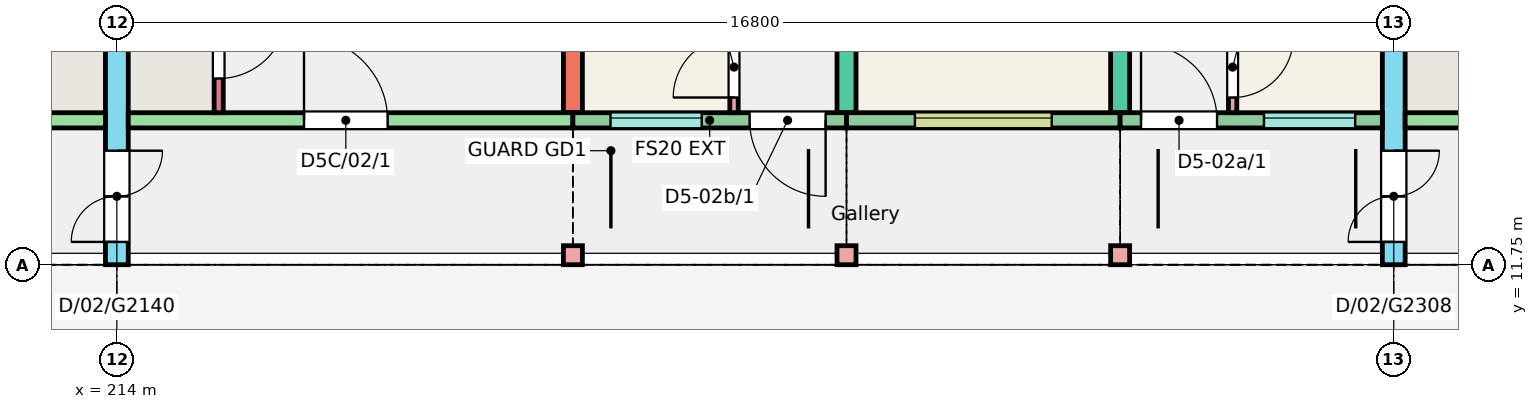
"""IFC4 building model, lengths in metres.
Left out: names, types, materials, properties, quantities, classifications, styles, units other than length and angle.
Written with IfcOpenShell. Run it as: python <this file> out.ifc"""

import sys

from ifc_helpers import new_model, si_unit, direction, frame, frame_2d, origin, origin_2d, place, context, subcontext, project, spatial, rectangle, extrude, element, fill, save


model = new_model("IFC4")
c1 = context("Model", 3, precision=1e-05, world=origin(), true_north=direction((0.0, 1.0)))
c2 = subcontext(c1, "Body", "Model", "MODEL_VIEW")
j1 = project(units=[si_unit("LENGTHUNIT", "METRE"), si_unit("PLANEANGLEUNIT", "RADIAN")], contexts=[c1])
p1 = place(None, origin())
s1 = spatial("IfcSite", under=j1, at=p1, CompositionType="ELEMENT")
p2 = place(p1, origin())
s2 = spatial("IfcBuilding", under=s1, at=p2, CompositionType="ELEMENT")
p3 = place(p2, frame((0.0, 0.0, 6.0)))
s3 = spatial("IfcBuildingStorey", under=s2, at=p3, CompositionType="ELEMENT", Elevation=6.0)
p4 = place(p3, frame((214.0, 11.75, 0.0), z_axis=(0.0, 0.0, 1.0), x_axis=(0.0, 1.0, 0.0)))
e1 = element("IfcWall", 1, at=p4, inside=s3, PredefinedType="SHEAR", context=c2, shape_type="SweptSolid", body=[
    extrude(rectangle(XDim=11.0, YDim=0.3, at=frame_2d((5.5, 0.0))), origin(), (0.0, 0.0, 1.0), 3.0),
])
p5 = place(p4, frame((0.3, 0.0, 0.0)))
e2 = element("IfcOpeningElement", 2, at=p5, cuts=e1, PredefinedType="OPENING", context=c2, shape_type="SweptSolid", body=[
    extrude(rectangle(XDim=1.2, YDim=2.1, at=frame_2d((0.6, 1.05))), frame((0.0, 0.16, 0.0), z_axis=(0.0, -1.0, 0.0), x_axis=(1.0, 0.0, 0.0)), (0.0, 0.0, 1.0), 0.32),
])
p6 = place(p3, frame((220.0, 13.75, 0.0), z_axis=(0.0, 0.0, 1.0), x_axis=(0.0, 1.0, 0.0)))
e3 = element("IfcWall", 3, at=p6, inside=s3, PredefinedType="SHEAR", context=c2, shape_type="SweptSolid", body=[
    extrude(rectangle(XDim=9.0, YDim=0.25, at=frame_2d((4.5, 0.0))), origin(), (0.0, 0.0, 1.0), 3.0),
])
p7 = place(p3, frame((223.6, 13.75, 0.0), z_axis=(0.0, 0.0, 1.0), x_axis=(0.0, 1.0, 0.0)))
e4 = element("IfcWall", 4, at=p7, inside=s3, PredefinedType="SHEAR", context=c2, shape_type="SweptSolid", body=[
    extrude(rectangle(XDim=9.0, YDim=0.25, at=frame_2d((4.5, 0.0))), origin(), (0.0, 0.0, 1.0), 3.0),
])
p8 = place(p7, frame((2.4, 0.0, 0.0)))
e5 = element("IfcOpeningElement", 5, at=p8, cuts=e4, PredefinedType="OPENING", context=c2, shape_type="SweptSolid", body=[
    extrude(rectangle(XDim=1.2, YDim=2.1, at=frame_2d((0.6, 1.05))), frame((0.0, 0.135, 0.0), z_axis=(0.0, -1.0, 0.0), x_axis=(1.0, 0.0, 0.0)), (0.0, 0.0, 1.0), 0.27),
])
p9 = place(p7, frame((6.4, 0.0, 0.0)))
e6 = element("IfcOpeningElement", 6, at=p9, cuts=e4, PredefinedType="OPENING", context=c2, shape_type="SweptSolid", body=[
    extrude(rectangle(XDim=1.2, YDim=2.1, at=frame_2d((0.6, 1.05))), frame((0.0, 0.135, 0.0), z_axis=(0.0, -1.0, 0.0), x_axis=(1.0, 0.0, 0.0)), (0.0, 0.0, 1.0), 0.27),
])
p10 = place(p3, frame((227.2, 13.75, 0.0), z_axis=(0.0, 0.0, 1.0), x_axis=(0.0, 1.0, 0.0)))
e7 = element("IfcWall", 7, at=p10, inside=s3, PredefinedType="SHEAR", context=c2, shape_type="SweptSolid", body=[
    extrude(rectangle(XDim=9.0, YDim=0.25, at=frame_2d((4.5, 0.0))), origin(), (0.0, 0.0, 1.0), 3.0),
])
p11 = place(p3, frame((230.8, 11.75, 0.0), z_axis=(0.0, 0.0, 1.0), x_axis=(0.0, 1.0, 0.0)))
e8 = element("IfcWall", 8, at=p11, inside=s3, PredefinedType="SHEAR", context=c2, shape_type="SweptSolid", body=[
    extrude(rectangle(XDim=11.0, YDim=0.3, at=frame_2d((5.5, 0.0))), origin(), (0.0, 0.0, 1.0), 3.0),
])
p12 = place(p11, frame((0.3, 0.0, 0.0)))
e9 = element("IfcOpeningElement", 9, at=p12, cuts=e8, PredefinedType="OPENING", context=c2, shape_type="SweptSolid", body=[
    extrude(rectangle(XDim=1.2, YDim=2.1, at=frame_2d((0.6, 1.05))), frame((0.0, 0.16, 0.0), z_axis=(0.0, -1.0, 0.0), x_axis=(1.0, 0.0, 0.0)), (0.0, 0.0, 1.0), 0.32),
])
p13 = place(p3, frame((208.0, 13.65, 0.0), z_axis=(0.0, 0.0, 1.0), x_axis=(1.0, 0.0, 0.0)))
e10 = element("IfcWall", 10, at=p13, inside=s3, PredefinedType="SHEAR", context=c2, shape_type="SweptSolid", body=[
    extrude(rectangle(XDim=5.85, YDim=0.2, at=frame_2d((2.925, 0.0))), origin(), (0.0, 0.0, 1.0), 3.0),
])
p14 = place(p13, frame((2.438, 0.0, 0.0)))
e11 = element("IfcOpeningElement", 11, at=p14, cuts=e10, PredefinedType="OPENING", context=c2, shape_type="SweptSolid", body=[
    extrude(rectangle(XDim=1.1, YDim=2.1, at=frame_2d((0.55, 1.05))), frame((0.0, 0.11, 0.0), z_axis=(0.0, -1.0, 0.0), x_axis=(1.0, 0.0, 0.0)), (0.0, 0.0, 1.0), 0.22),
])
p15 = place(p3, frame((214.15, 13.65, 0.0), z_axis=(0.0, 0.0, 1.0), x_axis=(1.0, 0.0, 0.0)))
e12 = element("IfcWall", 12, at=p15, inside=s3, PredefinedType="SHEAR", context=c2, shape_type="SweptSolid", body=[
    extrude(rectangle(XDim=5.85, YDim=0.2, at=frame_2d((2.925, 0.0))), origin(), (0.0, 0.0, 1.0), 3.0),
])
p16 = place(p15, frame((2.312, 0.0, 0.0)))
e13 = element("IfcOpeningElement", 13, at=p16, cuts=e12, PredefinedType="OPENING", context=c2, shape_type="SweptSolid", body=[
    extrude(rectangle(XDim=1.1, YDim=2.1, at=frame_2d((0.55, 1.05))), frame((0.0, 0.11, 0.0), z_axis=(0.0, -1.0, 0.0), x_axis=(1.0, 0.0, 0.0)), (0.0, 0.0, 1.0), 0.22),
])
p17 = place(p3, frame((215.34, 13.75, 0.0), z_axis=(0.0, 0.0, 1.0), x_axis=(0.0, 1.0, 0.0)))
e14 = element("IfcWall", 14, at=p17, inside=s3, PredefinedType="SHEAR", context=c2, shape_type="SweptSolid", body=[
    extrude(rectangle(XDim=1.72, YDim=0.12, at=frame_2d((0.86, 0.0))), origin(), (0.0, 0.0, 1.0), 3.0),
])
p18 = place(p17, frame((0.45, 0.0, 0.0)))
e15 = element("IfcOpeningElement", 15, at=p18, cuts=e14, PredefinedType="OPENING", context=c2, shape_type="SweptSolid", body=[
    extrude(rectangle(XDim=0.9, YDim=2.1, at=frame_2d((0.45, 1.05))), frame((0.0, 0.07, 0.0), z_axis=(0.0, -1.0, 0.0), x_axis=(1.0, 0.0, 0.0)), (0.0, 0.0, 1.0), 0.14),
])
p19 = place(p3, frame((220.0, 13.65, 0.0), z_axis=(0.0, 0.0, 1.0), x_axis=(1.0, 0.0, 0.0)))
e16 = element("IfcWall", 16, at=p19, inside=s3, PredefinedType="SOLIDWALL", context=c2, shape_type="SweptSolid", body=[
    extrude(rectangle(XDim=3.6, YDim=0.2, at=frame_2d((1.8, 0.0))), origin(), (0.0, 0.0, 1.0), 3.0),
])
p20 = place(p19, frame((0.495, 0.0, 1.1)))
e17 = element("IfcOpeningElement", 17, at=p20, cuts=e16, PredefinedType="OPENING", context=c2, shape_type="SweptSolid", body=[
    extrude(rectangle(XDim=1.2, YDim=1.3, at=frame_2d((0.6, 0.65))), frame((0.0, 0.11, 0.0), z_axis=(0.0, -1.0, 0.0), x_axis=(1.0, 0.0, 0.0)), (0.0, 0.0, 1.0), 0.22),
])
p21 = place(p19, frame((2.325, 0.0, 0.0)))
e18 = element("IfcOpeningElement", 18, at=p21, cuts=e16, PredefinedType="OPENING", context=c2, shape_type="SweptSolid", body=[
    extrude(rectangle(XDim=1.0, YDim=2.1, at=frame_2d((0.5, 1.05))), frame((0.0, 0.11, 0.0), z_axis=(0.0, -1.0, 0.0), x_axis=(1.0, 0.0, 0.0)), (0.0, 0.0, 1.0), 0.22),
])
p22 = place(p3, frame((223.6, 13.65, 0.0), z_axis=(0.0, 0.0, 1.0), x_axis=(1.0, 0.0, 0.0)))
e19 = element("IfcWall", 19, at=p22, inside=s3, PredefinedType="SOLIDWALL", context=c2, shape_type="SweptSolid", body=[
    extrude(rectangle(XDim=3.6, YDim=0.2, at=frame_2d((1.8, 0.0))), origin(), (0.0, 0.0, 1.0), 3.0),
])
p23 = place(p22, frame((0.9, 0.0, 1.1)))
e20 = element("IfcOpeningElement", 20, at=p23, cuts=e19, PredefinedType="OPENING", context=c2, shape_type="SweptSolid", body=[
    extrude(rectangle(XDim=1.8, YDim=1.3, at=frame_2d((0.9, 0.65))), frame((0.0, 0.11, 0.0), z_axis=(0.0, -1.0, 0.0), x_axis=(1.0, 0.0, 0.0)), (0.0, 0.0, 1.0), 0.22),
])
p24 = place(p3, frame((227.2, 13.65, 0.0), z_axis=(0.0, 0.0, 1.0), x_axis=(1.0, 0.0, 0.0)))
e21 = element("IfcWall", 21, at=p24, inside=s3, PredefinedType="SOLIDWALL", context=c2, shape_type="SweptSolid", body=[
    extrude(rectangle(XDim=3.45, YDim=0.2, at=frame_2d((1.725, 0.0))), origin(), (0.0, 0.0, 1.0), 3.0),
])
p25 = place(p24, frame((1.893, 0.0, 1.1)))
e22 = element("IfcOpeningElement", 22, at=p25, cuts=e21, PredefinedType="OPENING", context=c2, shape_type="SweptSolid", body=[
    extrude(rectangle(XDim=1.2, YDim=1.3, at=frame_2d((0.6, 0.65))), frame((0.0, 0.11, 0.0), z_axis=(0.0, -1.0, 0.0), x_axis=(1.0, 0.0, 0.0)), (0.0, 0.0, 1.0), 0.22),
])
p26 = place(p24, frame((0.275, 0.0, 0.0)))
e23 = element("IfcOpeningElement", 23, at=p26, cuts=e21, PredefinedType="OPENING", context=c2, shape_type="SweptSolid", body=[
    extrude(rectangle(XDim=1.0, YDim=2.1, at=frame_2d((0.5, 1.05))), frame((0.0, 0.11, 0.0), z_axis=(0.0, -1.0, 0.0), x_axis=(1.0, 0.0, 0.0)), (0.0, 0.0, 1.0), 0.22),
])
p27 = place(p3, frame((230.95, 13.65, 0.0), z_axis=(0.0, 0.0, 1.0), x_axis=(1.0, 0.0, 0.0)))
e24 = element("IfcWall", 24, at=p27, inside=s3, PredefinedType="SHEAR", context=c2, shape_type="SweptSolid", body=[
    extrude(rectangle(XDim=5.85, YDim=0.2, at=frame_2d((2.925, 0.0))), origin(), (0.0, 0.0, 1.0), 3.0),
])
p28 = place(p27, frame((2.312, 0.0, 0.0)))
e25 = element("IfcOpeningElement", 25, at=p28, cuts=e24, PredefinedType="OPENING", context=c2, shape_type="SweptSolid", body=[
    extrude(rectangle(XDim=1.1, YDim=2.1, at=frame_2d((0.55, 1.05))), frame((0.0, 0.11, 0.0), z_axis=(0.0, -1.0, 0.0), x_axis=(1.0, 0.0, 0.0)), (0.0, 0.0, 1.0), 0.22),
])
for number, where, z_axis, x_axis in (
    (26, (220.0, 11.875, 0.0), (0.0, 0.0, 1.0), (1.0, 0.0, 0.0)),
    (27, (223.6, 11.875, 0.0), (0.0, 0.0, 1.0), (1.0, 0.0, 0.0)),
    (28, (227.2, 11.875, 0.0), (0.0, 0.0, 1.0), (1.0, 0.0, 0.0)),
):
    element("IfcColumn", number, at=place(p3, frame(where, z_axis=z_axis, x_axis=x_axis)), inside=s3, PredefinedType="COLUMN", context=c2, shape_type="SweptSolid", body=[
        extrude(rectangle(XDim=0.25, YDim=0.25, at=origin_2d()), origin(), (0.0, 0.0, 1.0), 3.0),
    ])
p29 = place(p3, frame((228.68, 13.75, 0.0), z_axis=(0.0, 0.0, 1.0), x_axis=(0.0, 1.0, 0.0)))
e29 = element("IfcWall", 29, at=p29, inside=s3, PredefinedType="PARTITIONING", context=c2, shape_type="SweptSolid", body=[
    extrude(rectangle(XDim=4.3, YDim=0.11, at=frame_2d((2.15, 0.0))), origin(), (0.0, 0.0, 1.0), 2.8),
])
p30 = place(p29, frame((0.2, 0.0, 0.0)))
e30 = element("IfcOpeningElement", 30, at=p30, cuts=e29, PredefinedType="OPENING", context=c2, shape_type="SweptSolid", body=[
    extrude(rectangle(XDim=0.8, YDim=2.1, at=frame_2d((0.4, 1.05))), frame((0.0, 0.065, 0.0), z_axis=(0.0, -1.0, 0.0), x_axis=(1.0, 0.0, 0.0)), (0.0, 0.0, 1.0), 0.13),
])
p31 = place(p29, frame((3.35, 0.0, 0.0)))
e31 = element("IfcOpeningElement", 31, at=p31, cuts=e29, PredefinedType="OPENING", context=c2, shape_type="SweptSolid", body=[
    extrude(rectangle(XDim=0.8, YDim=2.1, at=frame_2d((0.4, 1.05))), frame((0.0, 0.065, 0.0), z_axis=(0.0, -1.0, 0.0), x_axis=(1.0, 0.0, 0.0)), (0.0, 0.0, 1.0), 0.13),
])
p32 = place(p3, frame((222.12, 13.75, 0.0), z_axis=(0.0, 0.0, 1.0), x_axis=(0.0, 1.0, 0.0)))
e32 = element("IfcWall", 32, at=p32, inside=s3, PredefinedType="PARTITIONING", context=c2, shape_type="SweptSolid", body=[
    extrude(rectangle(XDim=4.7, YDim=0.11, at=frame_2d((2.35, 0.0))), origin(), (0.0, 0.0, 1.0), 2.8),
])
p33 = place(p32, frame((0.2, 0.0, 0.0)))
e33 = element("IfcOpeningElement", 33, at=p33, cuts=e32, PredefinedType="OPENING", context=c2, shape_type="SweptSolid", body=[
    extrude(rectangle(XDim=0.8, YDim=2.1, at=frame_2d((0.4, 1.05))), frame((0.0, 0.065, 0.0), z_axis=(0.0, -1.0, 0.0), x_axis=(1.0, 0.0, 0.0)), (0.0, 0.0, 1.0), 0.13),
])
p34 = place(p32, frame((3.75, 0.0, 0.0)))
e34 = element("IfcOpeningElement", 34, at=p34, cuts=e32, PredefinedType="OPENING", context=c2, shape_type="SweptSolid", body=[
    extrude(rectangle(XDim=0.8, YDim=2.1, at=frame_2d((0.4, 1.05))), frame((0.0, 0.065, 0.0), z_axis=(0.0, -1.0, 0.0), x_axis=(1.0, 0.0, 0.0)), (0.0, 0.0, 1.0), 0.13),
])
p35 = place(p25, origin())
e35 = element("IfcWindow", 35, at=p35, inside=s3, PartitioningType="SINGLE_PANEL", PredefinedType="WINDOW", context=c2, shape_type="SweptSolid", body=[
    extrude(rectangle(XDim=1.2, YDim=1.3, at=frame_2d((0.6, 0.65))), frame((0.0, 0.06, 0.0), z_axis=(0.0, -1.0, 0.0), x_axis=(1.0, 0.0, 0.0)), (0.0, 0.0, 1.0), 0.06),
])
fill(e22, e35)
p36 = place(p23, origin())
e36 = element("IfcWindow", 36, at=p36, inside=s3, PartitioningType="SINGLE_PANEL", PredefinedType="WINDOW", context=c2, shape_type="SweptSolid", body=[
    extrude(rectangle(XDim=1.8, YDim=1.3, at=frame_2d((0.9, 0.65))), frame((0.0, 0.06, 0.0), z_axis=(0.0, -1.0, 0.0), x_axis=(1.0, 0.0, 0.0)), (0.0, 0.0, 1.0), 0.06),
])
fill(e20, e36)
p37 = place(p20, origin())
e37 = element("IfcWindow", 37, at=p37, inside=s3, PartitioningType="SINGLE_PANEL", PredefinedType="WINDOW", context=c2, shape_type="SweptSolid", body=[
    extrude(rectangle(XDim=1.2, YDim=1.3, at=frame_2d((0.6, 0.65))), frame((0.0, 0.06, 0.0), z_axis=(0.0, -1.0, 0.0), x_axis=(1.0, 0.0, 0.0)), (0.0, 0.0, 1.0), 0.06),
])
fill(e17, e37)
p38 = place(p26, origin())
e38 = element("IfcDoor", 38, at=p38, inside=s3, OperationType="SINGLE_SWING_LEFT", PredefinedType="DOOR", context=c2, shape_type="SweptSolid", body=[
    extrude(rectangle(XDim=1.0, YDim=2.1, at=frame_2d((0.5, 1.05))), frame((0.0, 0.025, 0.0), z_axis=(0.0, -1.0, 0.0), x_axis=(1.0, 0.0, 0.0)), (0.0, 0.0, 1.0), 0.05),
])
fill(e23, e38)
p39 = place(p30, origin())
e39 = element("IfcDoor", 39, at=p39, inside=s3, OperationType="SINGLE_SWING_RIGHT", PredefinedType="DOOR", context=c2, shape_type="SweptSolid", body=[
    extrude(rectangle(XDim=0.8, YDim=2.1, at=frame_2d((0.4, 1.05))), frame((0.0, 0.025, 0.0), z_axis=(0.0, -1.0, 0.0), x_axis=(1.0, 0.0, 0.0)), (0.0, 0.0, 1.0), 0.05),
])
fill(e30, e39)
p40 = place(p21, origin())
e40 = element("IfcDoor", 40, at=p40, inside=s3, OperationType="SINGLE_SWING_RIGHT", PredefinedType="DOOR", context=c2, shape_type="SweptSolid", body=[
    extrude(rectangle(XDim=1.0, YDim=2.1, at=frame_2d((0.5, 1.05))), frame((0.0, 0.025, 0.0), z_axis=(0.0, -1.0, 0.0), x_axis=(1.0, 0.0, 0.0)), (0.0, 0.0, 1.0), 0.05),
])
fill(e18, e40)
p41 = place(p33, origin())
e41 = element("IfcDoor", 41, at=p41, inside=s3, OperationType="SINGLE_SWING_LEFT", PredefinedType="DOOR", context=c2, shape_type="SweptSolid", body=[
    extrude(rectangle(XDim=0.8, YDim=2.1, at=frame_2d((0.4, 1.05))), frame((0.0, 0.025, 0.0), z_axis=(0.0, -1.0, 0.0), x_axis=(1.0, 0.0, 0.0)), (0.0, 0.0, 1.0), 0.05),
])
fill(e33, e41)
p42 = place(p16, origin())
e42 = element("IfcDoor", 42, at=p42, inside=s3, OperationType="SINGLE_SWING_LEFT", PredefinedType="DOOR", context=c2, shape_type="SweptSolid", body=[
    extrude(rectangle(XDim=1.1, YDim=2.1, at=frame_2d((0.55, 1.05))), frame((0.0, 0.025, 0.0), z_axis=(0.0, -1.0, 0.0), x_axis=(1.0, 0.0, 0.0)), (0.0, 0.0, 1.0), 0.05),
])
fill(e13, e42)
p43 = place(p18, origin())
e43 = element("IfcDoor", 43, at=p43, inside=s3, OperationType="SINGLE_SWING_RIGHT", PredefinedType="DOOR", context=c2, shape_type="SweptSolid", body=[
    extrude(rectangle(XDim=0.9, YDim=2.1, at=frame_2d((0.45, 1.05))), frame((0.0, 0.025, 0.0), z_axis=(0.0, -1.0, 0.0), x_axis=(1.0, 0.0, 0.0)), (0.0, 0.0, 1.0), 0.05),
])
fill(e15, e43)
p44 = place(p5, origin())
e44 = element("IfcDoor", 44, at=p44, inside=s3, OperationType="DOUBLE_DOOR_SINGLE_SWING", PredefinedType="DOOR", context=c2, shape_type="SweptSolid", body=[
    extrude(rectangle(XDim=1.2, YDim=2.1, at=frame_2d((0.6, 1.05))), frame((0.0, 0.025, 0.0), z_axis=(0.0, -1.0, 0.0), x_axis=(1.0, 0.0, 0.0)), (0.0, 0.0, 1.0), 0.05),
])
fill(e2, e44)
p45 = place(p12, origin())
e45 = element("IfcDoor", 45, at=p45, inside=s3, OperationType="DOUBLE_DOOR_SINGLE_SWING", PredefinedType="DOOR", context=c2, shape_type="SweptSolid", body=[
    extrude(rectangle(XDim=1.2, YDim=2.1, at=frame_2d((0.6, 1.05))), frame((0.0, 0.025, 0.0), z_axis=(0.0, -1.0, 0.0), x_axis=(1.0, 0.0, 0.0)), (0.0, 0.0, 1.0), 0.05),
])
fill(e9, e45)
save(model, sys.argv[1])
